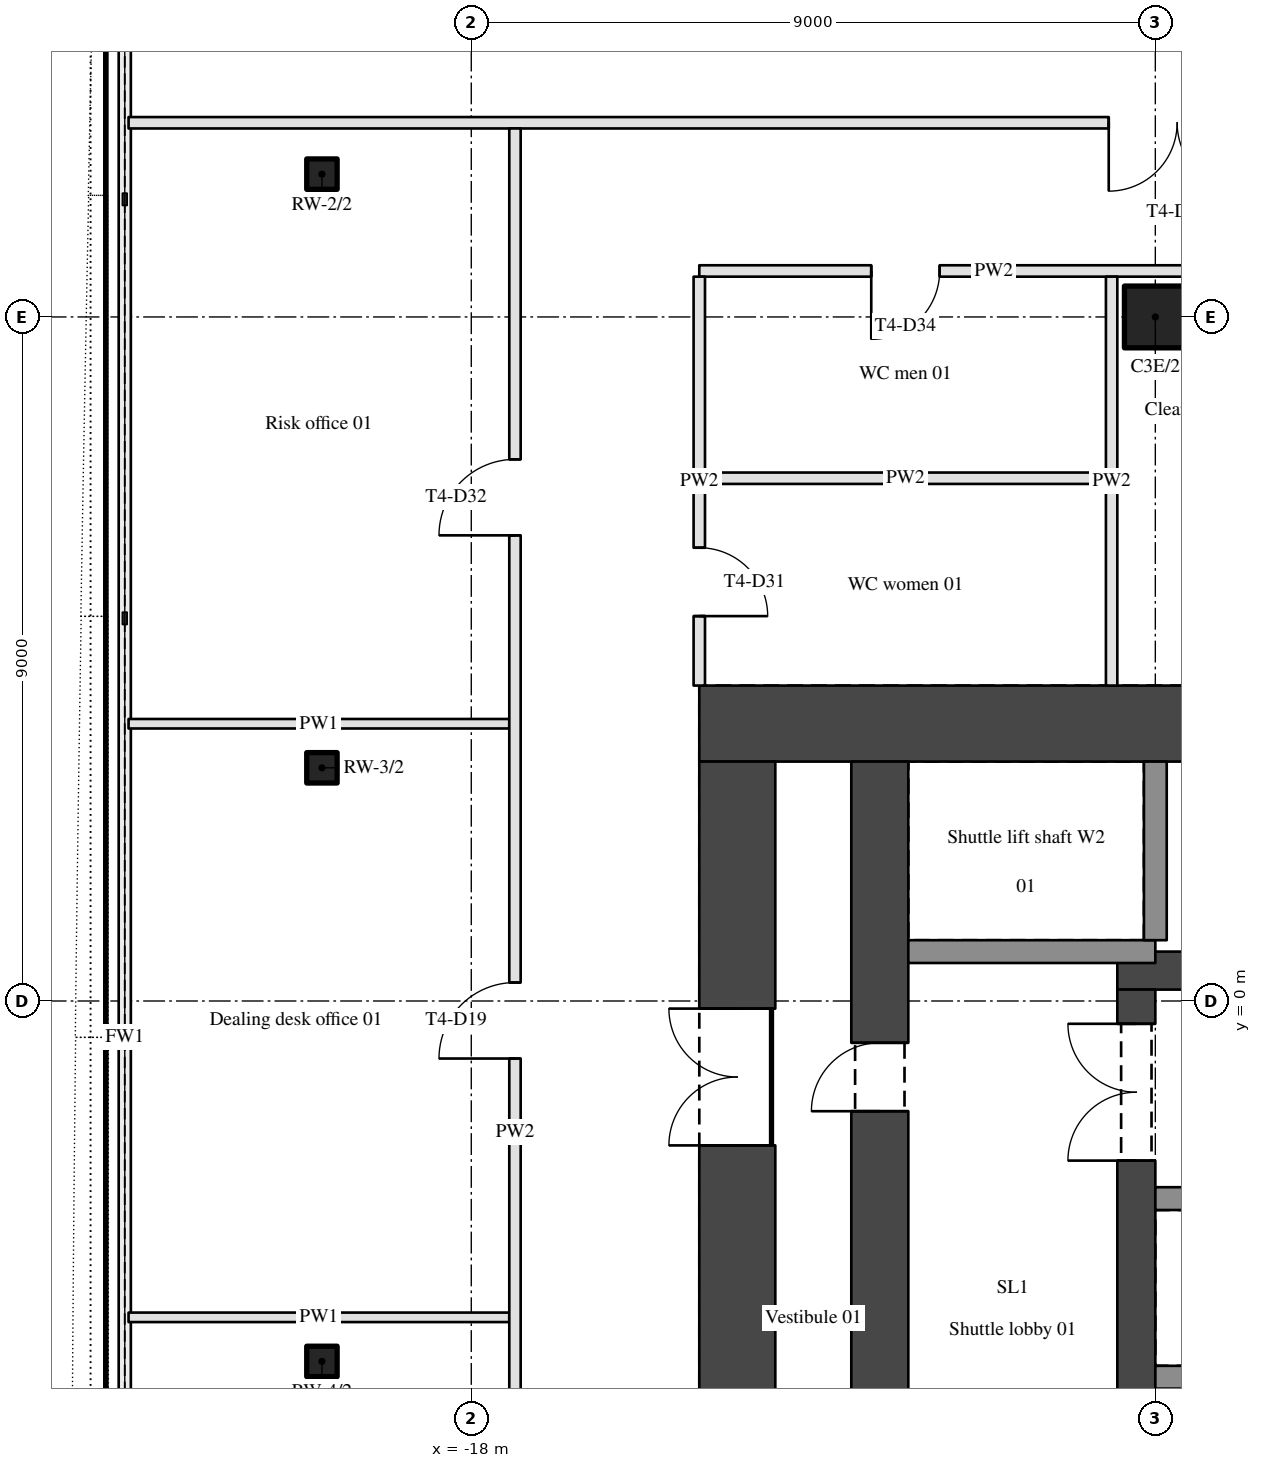
"""IFC4 building model, lengths in metres.
Left out: names, types, materials, properties, quantities, classifications, styles, units other than length and angle.
Written with IfcOpenShell. Run it as: python <this file> out.ifc"""

import sys

from ifc_helpers import new_model, si_unit, direction, frame, frame_2d, origin, origin_2d, place, context, subcontext, project, spatial, rectangle, hollow_rectangle, hollow_circle, extrude, element, fill, save


model = new_model("IFC4")
c1 = context("Model", 3, precision=1e-05, world=origin(), true_north=direction((0.0, 1.0)))
c2 = subcontext(c1, "Body", "Model", "MODEL_VIEW")
j1 = project(units=[si_unit("LENGTHUNIT", "METRE"), si_unit("PLANEANGLEUNIT", "RADIAN")], contexts=[c1])
p1 = place(None, origin())
s1 = spatial("IfcSite", under=j1, at=p1, CompositionType="ELEMENT")
p2 = place(p1, origin())
s2 = spatial("IfcBuilding", under=s1, at=p2, CompositionType="ELEMENT")
p3 = place(p2, frame((0.0, 0.0, 62.1)))
s3 = spatial("IfcBuildingStorey", under=s2, at=p3, CompositionType="ELEMENT", Elevation=62.1)
p4 = place(p3, frame((-9.0, 9.0, 0.0), z_axis=(0.0, 0.0, 1.0), x_axis=(1.0, 0.0, 0.0)))
e1 = element("IfcColumn", 1, at=p4, inside=s3, PredefinedType="COLUMN", context=c2, shape_type="SweptSolid", body=[
    extrude(hollow_circle(Radius=0.406, WallThickness=0.036, at=origin_2d()), origin(), (0.0, 0.0, 1.0), 3.9),
])
for number, where, z_axis, x_axis in (
    (2, (-19.965, 10.879, 0.0), (0.0, 0.0, 1.0), (1.0, 0.0, 0.0)),
    (3, (-19.965, 3.068, 0.0), (0.0, 0.0, 1.0), (1.0, 0.0, 0.0)),
    (4, (-19.965, -4.742, 0.0), (0.0, 0.0, 1.0), (1.0, 0.0, 0.0)),
):
    element("IfcColumn", number, at=place(p3, frame(where, z_axis=z_axis, x_axis=x_axis)), inside=s3, PredefinedType="COLUMN", context=c2, shape_type="SweptSolid", body=[
        extrude(hollow_rectangle(XDim=0.4, YDim=0.4, WallThickness=0.025, InnerFilletRadius=0.038, OuterFilletRadius=0.062, at=origin_2d()), origin(), (0.0, 0.0, 1.0), 3.9),
    ])
p5 = place(p3, frame((-15.0, 3.65, 0.0), z_axis=(0.0, 0.0, 1.0), x_axis=(1.0, 0.0, 0.0)))
e5 = element("IfcWall", 5, at=p5, inside=s3, PredefinedType="SHEAR", context=c2, shape_type="SweptSolid", body=[
    extrude(rectangle(XDim=30.0, YDim=1.0, at=frame_2d((15.0, 0.0))), origin(), (0.0, 0.0, 1.0), 3.9),
])
p6 = place(p3, frame((-14.5, -11.5, 0.0), z_axis=(0.0, 0.0, 1.0), x_axis=(0.0, 1.0, 0.0)))
e6 = element("IfcWall", 6, at=p6, inside=s3, PredefinedType="SHEAR", context=c2, shape_type="SweptSolid", body=[
    extrude(rectangle(XDim=14.65, YDim=1.0, at=frame_2d((7.325, 0.0))), origin(), (0.0, 0.0, 1.0), 3.9),
])
p7 = place(p6, frame((9.6, 0.0, 0.0)))
e7 = element("IfcOpeningElement", 7, at=p7, cuts=e6, PredefinedType="OPENING", context=c2, shape_type="SweptSolid", body=[
    extrude(rectangle(XDim=1.8, YDim=2.1, at=frame_2d((0.9, 1.05))), frame((0.0, 0.51, 0.0), z_axis=(0.0, -1.0, 0.0), x_axis=(1.0, 0.0, 0.0)), (0.0, 0.0, 1.0), 1.02),
])
p8 = place(p3, frame((-12.625, -11.5, 0.0), z_axis=(0.0, 0.0, 1.0), x_axis=(0.0, 1.0, 0.0)))
e8 = element("IfcWall", 8, at=p8, inside=s3, PredefinedType="SHEAR", context=c2, shape_type="SweptSolid", body=[
    extrude(rectangle(XDim=14.65, YDim=0.75, at=frame_2d((7.325, 0.0))), origin(), (0.0, 0.0, 1.0), 3.9),
])
p9 = place(p8, frame((10.05, 0.0, 0.0)))
e9 = element("IfcOpeningElement", 9, at=p9, cuts=e8, PredefinedType="OPENING", context=c2, shape_type="SweptSolid", body=[
    extrude(rectangle(XDim=0.9, YDim=2.1, at=frame_2d((0.45, 1.05))), frame((0.0, 0.385, 0.0), z_axis=(0.0, -1.0, 0.0), x_axis=(1.0, 0.0, 0.0)), (0.0, 0.0, 1.0), 0.77),
])
p10 = place(p3, frame((-9.5, 0.4, 0.0), z_axis=(0.0, 0.0, 1.0), x_axis=(1.0, 0.0, 0.0)))
e10 = element("IfcWall", 10, at=p10, inside=s3, PredefinedType="SHEAR", context=c2, shape_type="SweptSolid", body=[
    extrude(rectangle(XDim=19.0, YDim=0.5, at=frame_2d((9.5, 0.0))), origin(), (0.0, 0.0, 1.0), 3.9),
])
p11 = place(p10, frame((1.4, 0.0, 0.0)))
e11 = element("IfcOpeningElement", 11, at=p11, cuts=e10, PredefinedType="OPENING", context=c2, shape_type="SweptSolid", body=[
    extrude(rectangle(XDim=0.9, YDim=2.1, at=frame_2d((0.45, 1.05))), frame((0.0, 0.26, 0.0), z_axis=(0.0, -1.0, 0.0), x_axis=(1.0, 0.0, 0.0)), (0.0, 0.0, 1.0), 0.52),
])
p12 = place(p10, frame((4.1, 0.0, 0.0)))
e12 = element("IfcOpeningElement", 12, at=p12, cuts=e10, PredefinedType="OPENING", context=c2, shape_type="SweptSolid", body=[
    extrude(rectangle(XDim=0.9, YDim=2.1, at=frame_2d((0.45, 1.05))), frame((0.0, 0.26, 0.0), z_axis=(0.0, -1.0, 0.0), x_axis=(1.0, 0.0, 0.0)), (0.0, 0.0, 1.0), 0.52),
])
p13 = place(p10, frame((6.8, 0.0, 0.0)))
e13 = element("IfcOpeningElement", 13, at=p13, cuts=e10, PredefinedType="OPENING", context=c2, shape_type="SweptSolid", body=[
    extrude(rectangle(XDim=0.9, YDim=2.1, at=frame_2d((0.45, 1.05))), frame((0.0, 0.26, 0.0), z_axis=(0.0, -1.0, 0.0), x_axis=(1.0, 0.0, 0.0)), (0.0, 0.0, 1.0), 0.52),
])
p14 = place(p10, frame((11.3, 0.0, 0.0)))
e14 = element("IfcOpeningElement", 14, at=p14, cuts=e10, PredefinedType="OPENING", context=c2, shape_type="SweptSolid", body=[
    extrude(rectangle(XDim=0.9, YDim=2.1, at=frame_2d((0.45, 1.05))), frame((0.0, 0.26, 0.0), z_axis=(0.0, -1.0, 0.0), x_axis=(1.0, 0.0, 0.0)), (0.0, 0.0, 1.0), 0.52),
])
p15 = place(p10, frame((14.0, 0.0, 0.0)))
e15 = element("IfcOpeningElement", 15, at=p15, cuts=e10, PredefinedType="OPENING", context=c2, shape_type="SweptSolid", body=[
    extrude(rectangle(XDim=0.9, YDim=2.1, at=frame_2d((0.45, 1.05))), frame((0.0, 0.26, 0.0), z_axis=(0.0, -1.0, 0.0), x_axis=(1.0, 0.0, 0.0)), (0.0, 0.0, 1.0), 0.52),
])
p16 = place(p10, frame((16.7, 0.0, 0.0)))
e16 = element("IfcOpeningElement", 16, at=p16, cuts=e10, PredefinedType="OPENING", context=c2, shape_type="SweptSolid", body=[
    extrude(rectangle(XDim=0.9, YDim=2.1, at=frame_2d((0.45, 1.05))), frame((0.0, 0.26, 0.0), z_axis=(0.0, -1.0, 0.0), x_axis=(1.0, 0.0, 0.0)), (0.0, 0.0, 1.0), 0.52),
])
p17 = place(p10, frame((9.05, 0.0, 0.0)))
e17 = element("IfcOpeningElement", 17, at=p17, cuts=e10, PredefinedType="OPENING", context=c2, shape_type="SweptSolid", body=[
    extrude(rectangle(XDim=0.9, YDim=2.1, at=frame_2d((0.45, 1.05))), frame((0.0, 0.26, 0.0), z_axis=(0.0, -1.0, 0.0), x_axis=(1.0, 0.0, 0.0)), (0.0, 0.0, 1.0), 0.52),
])
p18 = place(p3, frame((-9.25, -11.5, 0.0), z_axis=(0.0, 0.0, 1.0), x_axis=(0.0, 1.0, 0.0)))
e18 = element("IfcWall", 18, at=p18, inside=s3, PredefinedType="SHEAR", context=c2, shape_type="SweptSolid", body=[
    extrude(rectangle(XDim=11.65, YDim=0.5, at=frame_2d((5.825, 0.0))), origin(), (0.0, 0.0, 1.0), 3.9),
])
p19 = place(p18, frame((9.4, 0.0, 0.0)))
e19 = element("IfcOpeningElement", 19, at=p19, cuts=e18, PredefinedType="OPENING", context=c2, shape_type="SweptSolid", body=[
    extrude(rectangle(XDim=1.8, YDim=2.1, at=frame_2d((0.9, 1.05))), frame((0.0, 0.26, 0.0), z_axis=(0.0, -1.0, 0.0), x_axis=(1.0, 0.0, 0.0)), (0.0, 0.0, 1.0), 0.52),
])
p20 = place(p18, frame((5.25, 0.0, 0.0)))
e20 = element("IfcOpeningElement", 20, at=p20, cuts=e18, PredefinedType="OPENING", context=c2, shape_type="SweptSolid", body=[
    extrude(rectangle(XDim=1.1, YDim=2.1, at=frame_2d((0.55, 1.05))), frame((0.0, 0.26, 0.0), z_axis=(0.0, -1.0, 0.0), x_axis=(1.0, 0.0, 0.0)), (0.0, 0.0, 1.0), 0.52),
])
p21 = place(p3, frame((-9.0, -4.95, 0.0), z_axis=(0.0, 0.0, 1.0), x_axis=(1.0, 0.0, 0.0)))
e21 = element("IfcWall", 21, at=p21, inside=s3, PredefinedType="SHEAR", context=c2, shape_type="SweptSolid", body=[
    extrude(rectangle(XDim=8.1, YDim=0.3, at=frame_2d((4.05, 0.0))), origin(), (0.0, 0.0, 1.0), 3.9),
])
p22 = place(p3, frame((-22.509, -4.162, 0.0), z_axis=(0.0, 0.0, 1.0), x_axis=(1.0, 0.0, 0.0)))
e22 = element("IfcWall", 22, at=p22, inside=s3, PredefinedType="PARTITIONING", context=c2, shape_type="SweptSolid", body=[
    extrude(rectangle(XDim=5.009, YDim=0.125, at=frame_2d((2.504, 0.0))), origin(), (0.0, 0.0, 1.0), 2.96),
])
p23 = place(p3, frame((-9.0, -2.6, 0.0), z_axis=(0.0, 0.0, 1.0), x_axis=(1.0, 0.0, 0.0)))
e23 = element("IfcWall", 23, at=p23, inside=s3, PredefinedType="SHEAR", context=c2, shape_type="SweptSolid", body=[
    extrude(rectangle(XDim=8.1, YDim=0.3, at=frame_2d((4.05, 0.0))), origin(), (0.0, 0.0, 1.0), 3.9),
])
p24 = place(p23, frame((0.8, 0.0, 0.0)))
e24 = element("IfcOpeningElement", 24, at=p24, cuts=e23, PredefinedType="OPENING", context=c2, shape_type="SweptSolid", body=[
    extrude(rectangle(XDim=1.1, YDim=2.1, at=frame_2d((0.55, 1.05))), frame((0.0, 0.16, 0.0), z_axis=(0.0, -1.0, 0.0), x_axis=(1.0, 0.0, 0.0)), (0.0, 0.0, 1.0), 0.32),
])
p25 = place(p23, frame((3.5, 0.0, 0.0)))
e25 = element("IfcOpeningElement", 25, at=p25, cuts=e23, PredefinedType="OPENING", context=c2, shape_type="SweptSolid", body=[
    extrude(rectangle(XDim=1.1, YDim=2.1, at=frame_2d((0.55, 1.05))), frame((0.0, 0.16, 0.0), z_axis=(0.0, -1.0, 0.0), x_axis=(1.0, 0.0, 0.0)), (0.0, 0.0, 1.0), 0.32),
])
p26 = place(p23, frame((6.2, 0.0, 0.0)))
e26 = element("IfcOpeningElement", 26, at=p26, cuts=e23, PredefinedType="OPENING", context=c2, shape_type="SweptSolid", body=[
    extrude(rectangle(XDim=1.1, YDim=2.1, at=frame_2d((0.55, 1.05))), frame((0.0, 0.16, 0.0), z_axis=(0.0, -1.0, 0.0), x_axis=(1.0, 0.0, 0.0)), (0.0, 0.0, 1.0), 0.32),
])
p27 = place(p3, frame((-9.0, 0.65, 0.0), z_axis=(0.0, 0.0, 1.0), x_axis=(-1.0, 0.0, 0.0)))
e27 = element("IfcWall", 27, at=p27, inside=s3, PredefinedType="SHEAR", context=c2, shape_type="SweptSolid", body=[
    extrude(rectangle(XDim=3.25, YDim=0.3, at=frame_2d((1.625, 0.0))), origin(), (0.0, 0.0, 1.0), 3.9),
])
p28 = place(p3, frame((-22.509, 3.648, 0.0), z_axis=(0.0, 0.0, 1.0), x_axis=(1.0, 0.0, 0.0)))
e28 = element("IfcWall", 28, at=p28, inside=s3, PredefinedType="PARTITIONING", context=c2, shape_type="SweptSolid", body=[
    extrude(rectangle(XDim=5.009, YDim=0.125, at=frame_2d((2.504, 0.0))), origin(), (0.0, 0.0, 1.0), 2.96),
])
p29 = place(p3, frame((-14.925, 6.878, 0.0), z_axis=(0.0, 0.0, 1.0), x_axis=(1.0, 0.0, 0.0)))
e29 = element("IfcWall", 29, at=p29, inside=s3, PredefinedType="PARTITIONING", context=c2, shape_type="SweptSolid", body=[
    extrude(rectangle(XDim=5.275, YDim=0.15, at=frame_2d((2.638, 0.0))), origin(), (0.0, 0.0, 1.0), 2.96),
])
p30 = place(p3, frame((-7.25, 9.605, 0.0), z_axis=(0.0, 0.0, 1.0), x_axis=(-1.0, 0.0, 0.0)))
e30 = element("IfcWall", 30, at=p30, inside=s3, PredefinedType="PARTITIONING", context=c2, shape_type="SweptSolid", body=[
    extrude(rectangle(XDim=7.75, YDim=0.15, at=frame_2d((3.875, 0.0))), origin(), (0.0, 0.0, 1.0), 2.96),
])
p31 = place(p30, frame((0.312, 0.0, 0.0)))
e31 = element("IfcOpeningElement", 31, at=p31, cuts=e30, PredefinedType="OPENING", context=c2, shape_type="SweptSolid", body=[
    extrude(rectangle(XDim=0.9, YDim=2.1, at=frame_2d((0.45, 1.05))), frame((0.0, 0.085, 0.0), z_axis=(0.0, -1.0, 0.0), x_axis=(1.0, 0.0, 0.0)), (0.0, 0.0, 1.0), 0.17),
])
p32 = place(p30, frame((4.587, 0.0, 0.0)))
e32 = element("IfcOpeningElement", 32, at=p32, cuts=e30, PredefinedType="OPENING", context=c2, shape_type="SweptSolid", body=[
    extrude(rectangle(XDim=0.9, YDim=2.1, at=frame_2d((0.45, 1.05))), frame((0.0, 0.085, 0.0), z_axis=(0.0, -1.0, 0.0), x_axis=(1.0, 0.0, 0.0)), (0.0, 0.0, 1.0), 0.17),
])
p33 = place(p3, frame((28.509, 11.555, 0.0), z_axis=(0.0, 0.0, 1.0), x_axis=(-1.0, 0.0, 0.0)))
e33 = element("IfcWall", 33, at=p33, inside=s3, PredefinedType="PARTITIONING", context=c2, shape_type="SweptSolid", body=[
    extrude(rectangle(XDim=51.018, YDim=0.15, at=frame_2d((25.509, 0.0))), origin(), (0.0, 0.0, 1.0), 2.96),
])
p34 = place(p33, frame((36.322, 0.0, 0.0)))
e34 = element("IfcOpeningElement", 34, at=p34, cuts=e33, PredefinedType="OPENING", context=c2, shape_type="SweptSolid", body=[
    extrude(rectangle(XDim=1.8, YDim=2.1, at=frame_2d((0.9, 1.05))), frame((0.0, 0.085, 0.0), z_axis=(0.0, -1.0, 0.0), x_axis=(1.0, 0.0, 0.0)), (0.0, 0.0, 1.0), 0.17),
])
p35 = place(p33, frame((18.896, 0.0, 0.0)))
e35 = element("IfcOpeningElement", 35, at=p35, cuts=e33, PredefinedType="OPENING", context=c2, shape_type="SweptSolid", body=[
    extrude(rectangle(XDim=1.8, YDim=2.1, at=frame_2d((0.9, 1.05))), frame((0.0, 0.085, 0.0), z_axis=(0.0, -1.0, 0.0), x_axis=(1.0, 0.0, 0.0)), (0.0, 0.0, 1.0), 0.17),
])
p36 = place(p3, frame((-17.425, -14.925, 0.0), z_axis=(0.0, 0.0, 1.0), x_axis=(0.0, 1.0, 0.0)))
e36 = element("IfcWall", 36, at=p36, inside=s3, PredefinedType="PARTITIONING", context=c2, shape_type="SweptSolid", body=[
    extrude(rectangle(XDim=26.405, YDim=0.15, at=frame_2d((13.203, 0.0))), origin(), (0.0, 0.0, 1.0), 2.96),
])
p37 = place(p36, frame((0.762, 0.0, 0.0)))
e37 = element("IfcOpeningElement", 37, at=p37, cuts=e36, PredefinedType="OPENING", context=c2, shape_type="SweptSolid", body=[
    extrude(rectangle(XDim=0.9, YDim=2.1, at=frame_2d((0.45, 1.05))), frame((0.0, 0.085, 0.0), z_axis=(0.0, -1.0, 0.0), x_axis=(1.0, 0.0, 0.0)), (0.0, 0.0, 1.0), 0.17),
])
p38 = place(p36, frame((6.357, 0.0, 0.0)))
e38 = element("IfcOpeningElement", 38, at=p38, cuts=e36, PredefinedType="OPENING", context=c2, shape_type="SweptSolid", body=[
    extrude(rectangle(XDim=1.0, YDim=2.1, at=frame_2d((0.5, 1.05))), frame((0.0, 0.085, 0.0), z_axis=(0.0, -1.0, 0.0), x_axis=(1.0, 0.0, 0.0)), (0.0, 0.0, 1.0), 0.17),
])
p39 = place(p36, frame((14.168, 0.0, 0.0)))
e39 = element("IfcOpeningElement", 39, at=p39, cuts=e36, PredefinedType="OPENING", context=c2, shape_type="SweptSolid", body=[
    extrude(rectangle(XDim=1.0, YDim=2.1, at=frame_2d((0.5, 1.05))), frame((0.0, 0.085, 0.0), z_axis=(0.0, -1.0, 0.0), x_axis=(1.0, 0.0, 0.0)), (0.0, 0.0, 1.0), 0.17),
])
p40 = place(p36, frame((21.052, 0.0, 0.0)))
e40 = element("IfcOpeningElement", 40, at=p40, cuts=e36, PredefinedType="OPENING", context=c2, shape_type="SweptSolid", body=[
    extrude(rectangle(XDim=1.0, YDim=2.1, at=frame_2d((0.5, 1.05))), frame((0.0, 0.085, 0.0), z_axis=(0.0, -1.0, 0.0), x_axis=(1.0, 0.0, 0.0)), (0.0, 0.0, 1.0), 0.17),
])
p41 = place(p3, frame((-15.0, 9.53, 0.0), z_axis=(0.0, 0.0, 1.0), x_axis=(0.0, -1.0, 0.0)))
e41 = element("IfcWall", 41, at=p41, inside=s3, PredefinedType="PARTITIONING", context=c2, shape_type="SweptSolid", body=[
    extrude(rectangle(XDim=5.38, YDim=0.15, at=frame_2d((2.69, 0.0))), origin(), (0.0, 0.0, 1.0), 2.96),
])
p42 = place(p41, frame((3.566, 0.0, 0.0)))
e42 = element("IfcOpeningElement", 42, at=p42, cuts=e41, PredefinedType="OPENING", context=c2, shape_type="SweptSolid", body=[
    extrude(rectangle(XDim=0.9, YDim=2.1, at=frame_2d((0.45, 1.05))), frame((0.0, 0.085, 0.0), z_axis=(0.0, -1.0, 0.0), x_axis=(1.0, 0.0, 0.0)), (0.0, 0.0, 1.0), 0.17),
])
p43 = place(p3, frame((-9.575, 4.15, 0.0), z_axis=(0.0, 0.0, 1.0), x_axis=(0.0, 1.0, 0.0)))
e43 = element("IfcWall", 43, at=p43, inside=s3, PredefinedType="PARTITIONING", context=c2, shape_type="SweptSolid", body=[
    extrude(rectangle(XDim=5.38, YDim=0.15, at=frame_2d((2.69, 0.0))), origin(), (0.0, 0.0, 1.0), 2.96),
])
p44 = place(p3, frame((-9.0, 0.8, 0.0), z_axis=(0.0, 0.0, 1.0), x_axis=(0.0, 1.0, 0.0)))
e44 = element("IfcWall", 44, at=p44, inside=s3, PredefinedType="SHEAR", context=c2, shape_type="SweptSolid", body=[
    extrude(rectangle(XDim=2.35, YDim=0.3, at=frame_2d((1.175, 0.0))), origin(), (0.0, 0.0, 1.0), 3.9),
])
p45 = place(p34, origin())
e45 = element("IfcDoor", 45, at=p45, inside=s3, OperationType="DOUBLE_DOOR_SINGLE_SWING", PredefinedType="DOOR", context=c2, shape_type="SweptSolid", body=[
    extrude(rectangle(XDim=1.8, YDim=2.1, at=frame_2d((0.9, 1.05))), frame((0.0, 0.025, 0.0), z_axis=(0.0, -1.0, 0.0), x_axis=(1.0, 0.0, 0.0)), (0.0, 0.0, 1.0), 0.05),
])
fill(e34, e45)
p46 = place(p7, origin())
e46 = element("IfcDoor", 46, at=p46, inside=s3, OperationType="DOUBLE_DOOR_SINGLE_SWING", PredefinedType="DOOR", context=c2, shape_type="SweptSolid", body=[
    extrude(rectangle(XDim=1.8, YDim=2.1, at=frame_2d((0.9, 1.05))), frame((0.0, 0.025, 0.0), z_axis=(0.0, -1.0, 0.0), x_axis=(1.0, 0.0, 0.0)), (0.0, 0.0, 1.0), 0.05),
])
fill(e7, e46)
p47 = place(p19, origin())
e47 = element("IfcDoor", 47, at=p47, inside=s3, OperationType="DOUBLE_DOOR_SINGLE_SWING", PredefinedType="DOOR", context=c2, shape_type="SweptSolid", body=[
    extrude(rectangle(XDim=1.8, YDim=2.1, at=frame_2d((0.9, 1.05))), frame((0.0, 0.025, 0.0), z_axis=(0.0, -1.0, 0.0), x_axis=(1.0, 0.0, 0.0)), (0.0, 0.0, 1.0), 0.05),
])
fill(e19, e47)
p48 = place(p39, origin())
e48 = element("IfcDoor", 48, at=p48, inside=s3, OperationType="SINGLE_SWING_LEFT", PredefinedType="DOOR", context=c2, shape_type="SweptSolid", body=[
    extrude(rectangle(XDim=1.0, YDim=2.1, at=frame_2d((0.5, 1.05))), frame((0.0, 0.025, 0.0), z_axis=(0.0, -1.0, 0.0), x_axis=(1.0, 0.0, 0.0)), (0.0, 0.0, 1.0), 0.05),
])
fill(e39, e48)
p49 = place(p40, origin())
e49 = element("IfcDoor", 49, at=p49, inside=s3, OperationType="SINGLE_SWING_LEFT", PredefinedType="DOOR", context=c2, shape_type="SweptSolid", body=[
    extrude(rectangle(XDim=1.0, YDim=2.1, at=frame_2d((0.5, 1.05))), frame((0.0, 0.025, 0.0), z_axis=(0.0, -1.0, 0.0), x_axis=(1.0, 0.0, 0.0)), (0.0, 0.0, 1.0), 0.05),
])
fill(e40, e49)
p50 = place(p32, origin())
e50 = element("IfcDoor", 50, at=p50, inside=s3, OperationType="SINGLE_SWING_RIGHT", PredefinedType="DOOR", context=c2, shape_type="SweptSolid", body=[
    extrude(rectangle(XDim=0.9, YDim=2.1, at=frame_2d((0.45, 1.05))), frame((0.0, 0.025, 0.0), z_axis=(0.0, -1.0, 0.0), x_axis=(1.0, 0.0, 0.0)), (0.0, 0.0, 1.0), 0.05),
])
fill(e32, e50)
p51 = place(p42, origin())
e51 = element("IfcDoor", 51, at=p51, inside=s3, OperationType="SINGLE_SWING_RIGHT", PredefinedType="DOOR", context=c2, shape_type="SweptSolid", body=[
    extrude(rectangle(XDim=0.9, YDim=2.1, at=frame_2d((0.45, 1.05))), frame((0.0, 0.025, 0.0), z_axis=(0.0, -1.0, 0.0), x_axis=(1.0, 0.0, 0.0)), (0.0, 0.0, 1.0), 0.05),
])
fill(e42, e51)
p52 = place(p9, origin())
e52 = element("IfcDoor", 52, at=p52, inside=s3, OperationType="SINGLE_SWING_LEFT", PredefinedType="DOOR", context=c2, shape_type="SweptSolid", body=[
    extrude(rectangle(XDim=0.9, YDim=2.1, at=frame_2d((0.45, 1.05))), frame((0.0, 0.025, 0.0), z_axis=(0.0, -1.0, 0.0), x_axis=(1.0, 0.0, 0.0)), (0.0, 0.0, 1.0), 0.05),
])
fill(e9, e52)
save(model, sys.argv[1])
